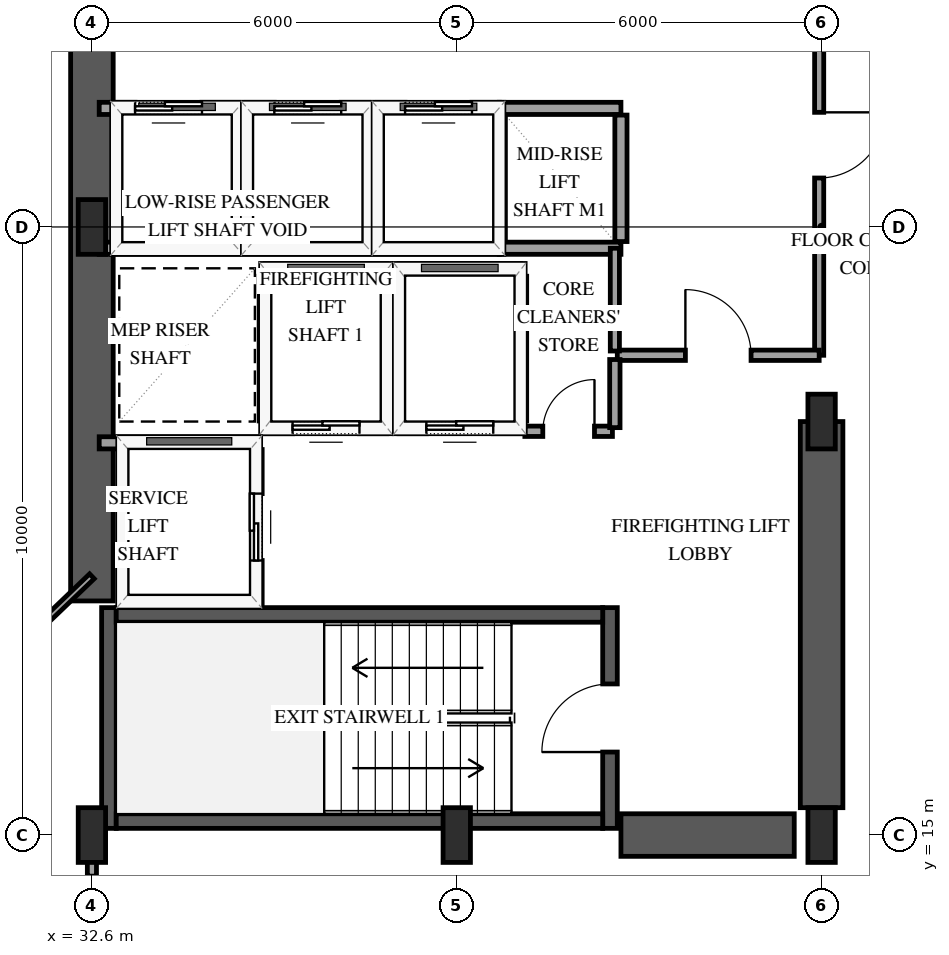
"""IFC4 building model, lengths in metres.
Left out: names, types, materials, properties, quantities, classifications, styles, units other than length and angle.
Written with IfcOpenShell. Run it as: python <this file> out.ifc"""

import sys

from ifc_helpers import new_model, si_unit, direction, frame, frame_2d, origin, origin_2d, place, context, subcontext, project, spatial, rectangle, extrude, element, fill, save


model = new_model("IFC4")
c1 = context("Model", 3, precision=1e-05, world=origin(), true_north=direction((0.0, 1.0)))
c2 = subcontext(c1, "Body", "Model", "MODEL_VIEW")
j1 = project(units=[si_unit("LENGTHUNIT", "METRE"), si_unit("PLANEANGLEUNIT", "RADIAN")], contexts=[c1])
p1 = place(None, origin())
s1 = spatial("IfcSite", under=j1, at=p1, CompositionType="ELEMENT")
p2 = place(p1, origin())
s2 = spatial("IfcBuilding", under=s1, at=p2, CompositionType="ELEMENT")
p3 = place(p2, frame((0.0, 0.0, 54.6)))
s3 = spatial("IfcBuildingStorey", under=s2, at=p3, CompositionType="ELEMENT", Elevation=54.6)
p4 = place(p3, frame((32.88, 15.11, 0.0), z_axis=(0.0, 0.0, 1.0), x_axis=(0.0, 1.0, 0.0)))
e1 = element("IfcWall", 1, at=p4, inside=s3, PredefinedType="SHEAR", context=c2, shape_type="SweptSolid", body=[
    extrude(rectangle(XDim=3.63, YDim=0.24, at=frame_2d((1.815, 0.0))), origin(), (0.0, 0.0, 1.0), 4.0),
])
p5 = place(p3, frame((41.12, 15.11, 0.0), z_axis=(0.0, 0.0, 1.0), x_axis=(0.0, 1.0, 0.0)))
e2 = element("IfcWall", 2, at=p5, inside=s3, PredefinedType="SHEAR", context=c2, shape_type="SweptSolid", body=[
    extrude(rectangle(XDim=3.63, YDim=0.24, at=frame_2d((1.815, 0.0))), origin(), (0.0, 0.0, 1.0), 4.0),
])
p6 = place(p5, frame((1.255, 0.0, 0.0)))
e3 = element("IfcOpeningElement", 3, at=p6, cuts=e2, PredefinedType="OPENING", context=c2, shape_type="SweptSolid", body=[
    extrude(rectangle(XDim=1.12, YDim=2.15, at=frame_2d((0.56, 1.075))), frame((0.0, 0.13, 0.0), z_axis=(0.0, -1.0, 0.0), x_axis=(1.0, 0.0, 0.0)), (0.0, 0.0, 1.0), 0.26),
])
for number, where, z_axis, x_axis in (
    (4, (33.0, 15.23, 0.0), (0.0, 0.0, 1.0), (1.0, 0.0, 0.0)),
    (5, (33.0, 18.62, 0.0), (0.0, 0.0, 1.0), (1.0, 0.0, 0.0)),
):
    element("IfcWall", number, at=place(p3, frame(where, z_axis=z_axis, x_axis=x_axis)), inside=s3, PredefinedType="SHEAR", context=c2, shape_type="SweptSolid", body=[
        extrude(rectangle(XDim=8.0, YDim=0.24, at=frame_2d((4.0, 0.0))), origin(), (0.0, 0.0, 1.0), 4.0),
    ])
p7 = place(p3, frame((32.6, 18.85, 0.0), z_axis=(0.0, 0.0, 1.0), x_axis=(0.0, 1.0, 0.0)))
e6 = element("IfcWall", 6, at=p7, inside=s3, PredefinedType="SHEAR", context=c2, shape_type="SweptSolid", body=[
    extrude(rectangle(XDim=12.3, YDim=0.7, at=frame_2d((6.15, 0.0))), origin(), (0.0, 0.0, 1.0), 4.0),
])
p8 = place(p3, frame((41.3, 15.0, 0.0), z_axis=(0.0, 0.0, 1.0), x_axis=(1.0, 0.0, 0.0)))
e7 = element("IfcWall", 7, at=p8, inside=s3, PredefinedType="SHEAR", context=c2, shape_type="SweptSolid", body=[
    extrude(rectangle(XDim=2.85, YDim=0.7, at=frame_2d((1.425, 0.0))), origin(), (0.0, 0.0, 1.0), 4.0),
])
p9 = place(p3, frame((44.6, 15.45, 0.0), z_axis=(0.0, 0.0, 1.0), x_axis=(0.0, 1.0, 0.0)))
e8 = element("IfcWall", 8, at=p9, inside=s3, PredefinedType="SHEAR", context=c2, shape_type="SweptSolid", body=[
    extrude(rectangle(XDim=6.35, YDim=0.7, at=frame_2d((3.175, 0.0))), origin(), (0.0, 0.0, 1.0), 4.0),
])
for number, where, z_axis, x_axis in (
    (9, (32.6, 15.0, 0.0), (0.0, 0.0, 1.0), (1.0, 0.0, 0.0)),
    (10, (32.6, 25.0, 0.0), (0.0, 0.0, 1.0), (1.0, 0.0, 0.0)),
    (11, (38.6, 15.0, 0.0), (0.0, 0.0, 1.0), (1.0, 0.0, 0.0)),
    (12, (44.6, 15.0, 0.0), (0.0, 0.0, 1.0), (1.0, 0.0, 0.0)),
    (13, (44.6, 21.8, 0.0), (0.0, 0.0, 1.0), (1.0, 0.0, 0.0)),
):
    element("IfcColumn", number, at=place(p3, frame(where, z_axis=z_axis, x_axis=x_axis)), inside=s3, PredefinedType="PILASTER", context=c2, shape_type="SweptSolid", body=[
        extrude(rectangle(XDim=0.45, YDim=0.9, at=origin_2d()), origin(), (0.0, 0.0, 1.0), 4.0),
    ])
p10 = place(p3, frame((35.45, 21.7, 0.0), z_axis=(0.0, 0.0, 1.0), x_axis=(1.0, 0.0, 0.0)))
e14 = element("IfcWall", 14, at=p10, inside=s3, PredefinedType="SOLIDWALL", context=c2, shape_type="SweptSolid", body=[
    extrude(rectangle(XDim=2.0, YDim=0.2, at=frame_2d((1.0, 0.0))), origin(), (0.0, 0.0, 1.0), 3.7),
])
p11 = place(p10, frame((0.45, 0.0, 0.0)))
e15 = element("IfcOpeningElement", 15, at=p11, cuts=e14, PredefinedType="OPENING", context=c2, shape_type="SweptSolid", body=[
    extrude(rectangle(XDim=1.1, YDim=2.15, at=frame_2d((0.55, 1.075))), frame((0.0, 0.11, 0.0), z_axis=(0.0, -1.0, 0.0), x_axis=(1.0, 0.0, 0.0)), (0.0, 0.0, 1.0), 0.22),
])
p12 = place(p3, frame((35.45, 24.3, 0.0), z_axis=(0.0, 0.0, 1.0), x_axis=(1.0, 0.0, 0.0)))
e16 = element("IfcWall", 16, at=p12, inside=s3, PredefinedType="SOLIDWALL", context=c2, shape_type="SweptSolid", body=[
    extrude(rectangle(XDim=2.0, YDim=0.2, at=frame_2d((1.0, 0.0))), origin(), (0.0, 0.0, 1.0), 3.7),
])
for number, where, z_axis, x_axis in (
    (17, (35.45, 21.81, 0.0), (0.0, 0.0, 1.0), (0.0, 1.0, 0.0)),
    (18, (37.45, 21.81, 0.0), (0.0, 0.0, 1.0), (0.0, 1.0, 0.0)),
):
    element("IfcWall", number, at=place(p3, frame(where, z_axis=z_axis, x_axis=x_axis)), inside=s3, PredefinedType="SOLIDWALL", context=c2, shape_type="SweptSolid", body=[
        extrude(rectangle(XDim=2.38, YDim=0.2, at=frame_2d((1.19, 0.0))), origin(), (0.0, 0.0, 1.0), 3.7),
    ])
p13 = place(p3, frame((37.65, 21.7, 0.0), z_axis=(0.0, 0.0, 1.0), x_axis=(1.0, 0.0, 0.0)))
e19 = element("IfcWall", 19, at=p13, inside=s3, PredefinedType="SOLIDWALL", context=c2, shape_type="SweptSolid", body=[
    extrude(rectangle(XDim=2.0, YDim=0.2, at=frame_2d((1.0, 0.0))), origin(), (0.0, 0.0, 1.0), 3.7),
])
p14 = place(p13, frame((0.45, 0.0, 0.0)))
e20 = element("IfcOpeningElement", 20, at=p14, cuts=e19, PredefinedType="OPENING", context=c2, shape_type="SweptSolid", body=[
    extrude(rectangle(XDim=1.1, YDim=2.15, at=frame_2d((0.55, 1.075))), frame((0.0, 0.11, 0.0), z_axis=(0.0, -1.0, 0.0), x_axis=(1.0, 0.0, 0.0)), (0.0, 0.0, 1.0), 0.22),
])
p15 = place(p3, frame((37.65, 24.3, 0.0), z_axis=(0.0, 0.0, 1.0), x_axis=(1.0, 0.0, 0.0)))
e21 = element("IfcWall", 21, at=p15, inside=s3, PredefinedType="SOLIDWALL", context=c2, shape_type="SweptSolid", body=[
    extrude(rectangle(XDim=2.0, YDim=0.2, at=frame_2d((1.0, 0.0))), origin(), (0.0, 0.0, 1.0), 3.7),
])
p16 = place(p3, frame((39.65, 21.81, 0.0), z_axis=(0.0, 0.0, 1.0), x_axis=(0.0, 1.0, 0.0)))
e22 = element("IfcWall", 22, at=p16, inside=s3, PredefinedType="SOLIDWALL", context=c2, shape_type="SweptSolid", body=[
    extrude(rectangle(XDim=2.38, YDim=0.2, at=frame_2d((1.19, 0.0))), origin(), (0.0, 0.0, 1.0), 3.7),
])
p17 = place(p3, frame((32.72, 21.45, 0.0), z_axis=(0.0, 0.0, 1.0), x_axis=(1.0, 0.0, 0.0)))
e23 = element("IfcWall", 23, at=p17, inside=s3, PredefinedType="SOLIDWALL", context=c2, shape_type="SweptSolid", body=[
    extrude(rectangle(XDim=2.58, YDim=0.2, at=frame_2d((1.29, 0.0))), origin(), (0.0, 0.0, 1.0), 3.7),
])
p18 = place(p3, frame((35.3, 18.79, 0.0), z_axis=(0.0, 0.0, 1.0), x_axis=(0.0, 1.0, 0.0)))
e24 = element("IfcWall", 24, at=p18, inside=s3, PredefinedType="SOLIDWALL", context=c2, shape_type="SweptSolid", body=[
    extrude(rectangle(XDim=2.55, YDim=0.2, at=frame_2d((1.275, 0.0))), origin(), (0.0, 0.0, 1.0), 3.7),
])
p19 = place(p18, frame((0.725, 0.0, 0.0)))
e25 = element("IfcOpeningElement", 25, at=p19, cuts=e24, PredefinedType="OPENING", context=c2, shape_type="SweptSolid", body=[
    extrude(rectangle(XDim=1.1, YDim=2.15, at=frame_2d((0.55, 1.075))), frame((0.0, 0.11, 0.0), z_axis=(0.0, -1.0, 0.0), x_axis=(1.0, 0.0, 0.0)), (0.0, 0.0, 1.0), 0.22),
])
p20 = place(p3, frame((32.72, 24.65, 0.0), z_axis=(0.0, 0.0, 1.0), x_axis=(1.0, 0.0, 0.0)))
e26 = element("IfcWall", 26, at=p20, inside=s3, PredefinedType="SOLIDWALL", context=c2, shape_type="SweptSolid", body=[
    extrude(rectangle(XDim=2.28, YDim=0.2, at=frame_2d((1.14, 0.0))), origin(), (0.0, 0.0, 1.0), 3.7),
])
p21 = place(p3, frame((32.72, 26.95, 0.0), z_axis=(0.0, 0.0, 1.0), x_axis=(1.0, 0.0, 0.0)))
e27 = element("IfcWall", 27, at=p21, inside=s3, PredefinedType="SOLIDWALL", context=c2, shape_type="SweptSolid", body=[
    extrude(rectangle(XDim=2.28, YDim=0.2, at=frame_2d((1.14, 0.0))), origin(), (0.0, 0.0, 1.0), 3.7),
])
p22 = place(p21, frame((0.59, 0.0, 0.0)))
e28 = element("IfcOpeningElement", 28, at=p22, cuts=e27, PredefinedType="OPENING", context=c2, shape_type="SweptSolid", body=[
    extrude(rectangle(XDim=1.1, YDim=2.15, at=frame_2d((0.55, 1.075))), frame((0.0, 0.11, 0.0), z_axis=(0.0, -1.0, 0.0), x_axis=(1.0, 0.0, 0.0)), (0.0, 0.0, 1.0), 0.22),
])
p23 = place(p3, frame((35.0, 24.76, 0.0), z_axis=(0.0, 0.0, 1.0), x_axis=(0.0, 1.0, 0.0)))
e29 = element("IfcWall", 29, at=p23, inside=s3, PredefinedType="SOLIDWALL", context=c2, shape_type="SweptSolid", body=[
    extrude(rectangle(XDim=2.08, YDim=0.2, at=frame_2d((1.04, 0.0))), origin(), (0.0, 0.0, 1.0), 3.7),
])
p24 = place(p3, frame((35.15, 24.65, 0.0), z_axis=(0.0, 0.0, 1.0), x_axis=(1.0, 0.0, 0.0)))
e30 = element("IfcWall", 30, at=p24, inside=s3, PredefinedType="SOLIDWALL", context=c2, shape_type="SweptSolid", body=[
    extrude(rectangle(XDim=2.0, YDim=0.2, at=frame_2d((1.0, 0.0))), origin(), (0.0, 0.0, 1.0), 3.7),
])
p25 = place(p3, frame((35.15, 26.95, 0.0), z_axis=(0.0, 0.0, 1.0), x_axis=(1.0, 0.0, 0.0)))
e31 = element("IfcWall", 31, at=p25, inside=s3, PredefinedType="SOLIDWALL", context=c2, shape_type="SweptSolid", body=[
    extrude(rectangle(XDim=2.0, YDim=0.2, at=frame_2d((1.0, 0.0))), origin(), (0.0, 0.0, 1.0), 3.7),
])
p26 = place(p25, frame((0.45, 0.0, 0.0)))
e32 = element("IfcOpeningElement", 32, at=p26, cuts=e31, PredefinedType="OPENING", context=c2, shape_type="SweptSolid", body=[
    extrude(rectangle(XDim=1.1, YDim=2.15, at=frame_2d((0.55, 1.075))), frame((0.0, 0.11, 0.0), z_axis=(0.0, -1.0, 0.0), x_axis=(1.0, 0.0, 0.0)), (0.0, 0.0, 1.0), 0.22),
])
p27 = place(p3, frame((37.15, 24.76, 0.0), z_axis=(0.0, 0.0, 1.0), x_axis=(0.0, 1.0, 0.0)))
e33 = element("IfcWall", 33, at=p27, inside=s3, PredefinedType="SOLIDWALL", context=c2, shape_type="SweptSolid", body=[
    extrude(rectangle(XDim=2.08, YDim=0.2, at=frame_2d((1.04, 0.0))), origin(), (0.0, 0.0, 1.0), 3.7),
])
p28 = place(p3, frame((37.3, 24.65, 0.0), z_axis=(0.0, 0.0, 1.0), x_axis=(1.0, 0.0, 0.0)))
e34 = element("IfcWall", 34, at=p28, inside=s3, PredefinedType="SOLIDWALL", context=c2, shape_type="SweptSolid", body=[
    extrude(rectangle(XDim=2.0, YDim=0.2, at=frame_2d((1.0, 0.0))), origin(), (0.0, 0.0, 1.0), 3.7),
])
p29 = place(p3, frame((37.3, 26.95, 0.0), z_axis=(0.0, 0.0, 1.0), x_axis=(1.0, 0.0, 0.0)))
e35 = element("IfcWall", 35, at=p29, inside=s3, PredefinedType="SOLIDWALL", context=c2, shape_type="SweptSolid", body=[
    extrude(rectangle(XDim=2.0, YDim=0.2, at=frame_2d((1.0, 0.0))), origin(), (0.0, 0.0, 1.0), 3.7),
])
p30 = place(p29, frame((0.45, 0.0, 0.0)))
e36 = element("IfcOpeningElement", 36, at=p30, cuts=e35, PredefinedType="OPENING", context=c2, shape_type="SweptSolid", body=[
    extrude(rectangle(XDim=1.1, YDim=2.15, at=frame_2d((0.55, 1.075))), frame((0.0, 0.11, 0.0), z_axis=(0.0, -1.0, 0.0), x_axis=(1.0, 0.0, 0.0)), (0.0, 0.0, 1.0), 0.22),
])
p31 = place(p3, frame((39.3, 24.76, 0.0), z_axis=(0.0, 0.0, 1.0), x_axis=(0.0, 1.0, 0.0)))
e37 = element("IfcWall", 37, at=p31, inside=s3, PredefinedType="SOLIDWALL", context=c2, shape_type="SweptSolid", body=[
    extrude(rectangle(XDim=2.08, YDim=0.2, at=frame_2d((1.04, 0.0))), origin(), (0.0, 0.0, 1.0), 3.7),
])
for number, where, z_axis, x_axis in (
    (38, (39.3, 24.65, 0.0), (0.0, 0.0, 1.0), (1.0, 0.0, 0.0)),
    (39, (39.3, 26.95, 0.0), (0.0, 0.0, 1.0), (1.0, 0.0, 0.0)),
):
    element("IfcWall", number, at=place(p3, frame(where, z_axis=z_axis, x_axis=x_axis)), inside=s3, PredefinedType="SOLIDWALL", context=c2, shape_type="SweptSolid", body=[
        extrude(rectangle(XDim=2.0, YDim=0.2, at=frame_2d((1.0, 0.0))), origin(), (0.0, 0.0, 1.0), 3.7),
    ])
p32 = place(p3, frame((41.3, 24.76, 0.0), z_axis=(0.0, 0.0, 1.0), x_axis=(0.0, 1.0, 0.0)))
e40 = element("IfcWall", 40, at=p32, inside=s3, PredefinedType="SOLIDWALL", context=c2, shape_type="SweptSolid", body=[
    extrude(rectangle(XDim=2.08, YDim=0.2, at=frame_2d((1.04, 0.0))), origin(), (0.0, 0.0, 1.0), 3.7),
])
p33 = place(p3, frame((44.56, 29.8, 0.0), z_axis=(0.0, 0.0, 1.0), x_axis=(0.0, -1.0, 0.0)))
e41 = element("IfcWall", 41, at=p33, inside=s3, PredefinedType="PARTITIONING", context=c2, shape_type="SweptSolid", body=[
    extrude(rectangle(XDim=6.91, YDim=0.15, at=frame_2d((3.455, 0.0))), origin(), (0.0, 0.0, 1.0), 2.74),
])
p34 = place(p33, frame((2.915, 0.0, 0.0)))
e42 = element("IfcOpeningElement", 42, at=p34, cuts=e41, PredefinedType="OPENING", context=c2, shape_type="SweptSolid", body=[
    extrude(rectangle(XDim=1.08, YDim=2.15, at=frame_2d((0.54, 1.075))), frame((0.0, 0.085, 0.0), z_axis=(0.0, -1.0, 0.0), x_axis=(1.0, 0.0, 0.0)), (0.0, 0.0, 1.0), 0.17),
])
p35 = place(p3, frame((32.6, 19.255, 0.0), z_axis=(0.0, 0.0, 1.0), x_axis=(-0.72235688482, -0.691520448687, 0.0)))
e43 = element("IfcWall", 43, at=p35, inside=s3, PredefinedType="PARTITIONING", context=c2, shape_type="SweptSolid", body=[
    extrude(rectangle(XDim=6.848, YDim=0.11, at=frame_2d((3.424, 0.0))), origin(), (0.0, 0.0, 1.0), 3.7),
])
p36 = place(p3, frame((41.24, 22.89, 0.0), z_axis=(0.0, 0.0, 1.0), x_axis=(1.0, 0.0, 0.0)))
e44 = element("IfcWall", 44, at=p36, inside=s3, PredefinedType="PARTITIONING", context=c2, shape_type="SweptSolid", body=[
    extrude(rectangle(XDim=3.32, YDim=0.17, at=frame_2d((1.66, 0.0))), origin(), (0.0, 0.0, 1.0), 3.7),
])
p37 = place(p36, frame((1.12, 0.0, 0.0)))
e45 = element("IfcOpeningElement", 45, at=p37, cuts=e44, PredefinedType="OPENING", context=c2, shape_type="SweptSolid", body=[
    extrude(rectangle(XDim=1.08, YDim=2.15, at=frame_2d((0.54, 1.075))), frame((0.0, 0.095, 0.0), z_axis=(0.0, -1.0, 0.0), x_axis=(1.0, 0.0, 0.0)), (0.0, 0.0, 1.0), 0.19),
])
p38 = place(p3, frame((32.6, 13.02, 0.0), z_axis=(0.0, 0.0, 1.0), x_axis=(0.0, 1.0, 0.0)))
e46 = element("IfcWall", 46, at=p38, inside=s3, PredefinedType="PARTITIONING", context=c2, shape_type="SweptSolid", body=[
    extrude(rectangle(XDim=1.91, YDim=0.15, at=frame_2d((0.955, 0.0))), origin(), (0.0, 0.0, 1.0), 3.7),
])
p39 = place(p38, frame((0.384, 0.0, 0.0)))
e47 = element("IfcOpeningElement", 47, at=p39, cuts=e46, PredefinedType="OPENING", context=c2, shape_type="SweptSolid", body=[
    extrude(rectangle(XDim=0.92, YDim=2.12, at=frame_2d((0.46, 1.06))), frame((0.0, 0.085, 0.0), z_axis=(0.0, -1.0, 0.0), x_axis=(1.0, 0.0, 0.0)), (0.0, 0.0, 1.0), 0.17),
])
p40 = place(p3, frame((41.2, 22.96, 0.0), z_axis=(0.0, 0.0, 1.0), x_axis=(0.0, 1.0, 0.0)))
e48 = element("IfcWall", 48, at=p40, inside=s3, PredefinedType="PARTITIONING", context=c2, shape_type="SweptSolid", body=[
    extrude(rectangle(XDim=1.69, YDim=0.15, at=frame_2d((0.845, 0.0))), origin(), (0.0, 0.0, 1.0), 3.7),
])
p41 = place(p3, frame((39.72, 21.64, 0.0), z_axis=(0.0, 0.0, 1.0), x_axis=(1.0, 0.0, 0.0)))
e49 = element("IfcWall", 49, at=p41, inside=s3, PredefinedType="PARTITIONING", context=c2, shape_type="SweptSolid", body=[
    extrude(rectangle(XDim=1.44, YDim=0.17, at=frame_2d((0.72, 0.0))), origin(), (0.0, 0.0, 1.0), 3.7),
])
p42 = place(p41, frame((0.295, 0.0, 0.0)))
e50 = element("IfcOpeningElement", 50, at=p42, cuts=e49, PredefinedType="OPENING", context=c2, shape_type="SweptSolid", body=[
    extrude(rectangle(XDim=0.85, YDim=2.1, at=frame_2d((0.425, 1.05))), frame((0.0, 0.095, 0.0), z_axis=(0.0, -1.0, 0.0), x_axis=(1.0, 0.0, 0.0)), (0.0, 0.0, 1.0), 0.19),
])
p43 = place(p3, frame((41.2, 21.7, 0.0), z_axis=(0.0, 0.0, 1.0), x_axis=(0.0, 1.0, 0.0)))
e51 = element("IfcWall", 51, at=p43, inside=s3, PredefinedType="PARTITIONING", context=c2, shape_type="SweptSolid", body=[
    extrude(rectangle(XDim=1.12, YDim=0.17, at=frame_2d((0.56, 0.0))), origin(), (0.0, 0.0, 1.0), 3.7),
])
p44 = place(p11, origin())
e52 = element("IfcDoor", 52, at=p44, inside=s3, OperationType="SLIDING_TO_LEFT", PredefinedType="DOOR", context=c2, shape_type="SweptSolid", body=[
    extrude(rectangle(XDim=1.1, YDim=2.15, at=frame_2d((0.55, 1.075))), frame((0.0, 0.025, 0.0), z_axis=(0.0, -1.0, 0.0), x_axis=(1.0, 0.0, 0.0)), (0.0, 0.0, 1.0), 0.05),
])
fill(e15, e52)
p45 = place(p14, origin())
e53 = element("IfcDoor", 53, at=p45, inside=s3, OperationType="SLIDING_TO_LEFT", PredefinedType="DOOR", context=c2, shape_type="SweptSolid", body=[
    extrude(rectangle(XDim=1.1, YDim=2.15, at=frame_2d((0.55, 1.075))), frame((0.0, 0.025, 0.0), z_axis=(0.0, -1.0, 0.0), x_axis=(1.0, 0.0, 0.0)), (0.0, 0.0, 1.0), 0.05),
])
fill(e20, e53)
p46 = place(p19, origin())
e54 = element("IfcDoor", 54, at=p46, inside=s3, OperationType="SLIDING_TO_LEFT", PredefinedType="DOOR", context=c2, shape_type="SweptSolid", body=[
    extrude(rectangle(XDim=1.1, YDim=2.15, at=frame_2d((0.55, 1.075))), frame((0.0, 0.025, 0.0), z_axis=(0.0, -1.0, 0.0), x_axis=(1.0, 0.0, 0.0)), (0.0, 0.0, 1.0), 0.05),
])
fill(e25, e54)
p47 = place(p22, origin())
e55 = element("IfcDoor", 55, at=p47, inside=s3, OperationType="SLIDING_TO_LEFT", PredefinedType="DOOR", context=c2, shape_type="SweptSolid", body=[
    extrude(rectangle(XDim=1.1, YDim=2.15, at=frame_2d((0.55, 1.075))), frame((0.0, 0.025, 0.0), z_axis=(0.0, -1.0, 0.0), x_axis=(1.0, 0.0, 0.0)), (0.0, 0.0, 1.0), 0.05),
])
fill(e28, e55)
p48 = place(p26, origin())
e56 = element("IfcDoor", 56, at=p48, inside=s3, OperationType="SLIDING_TO_LEFT", PredefinedType="DOOR", context=c2, shape_type="SweptSolid", body=[
    extrude(rectangle(XDim=1.1, YDim=2.15, at=frame_2d((0.55, 1.075))), frame((0.0, 0.025, 0.0), z_axis=(0.0, -1.0, 0.0), x_axis=(1.0, 0.0, 0.0)), (0.0, 0.0, 1.0), 0.05),
])
fill(e32, e56)
p49 = place(p30, origin())
e57 = element("IfcDoor", 57, at=p49, inside=s3, OperationType="SLIDING_TO_LEFT", PredefinedType="DOOR", context=c2, shape_type="SweptSolid", body=[
    extrude(rectangle(XDim=1.1, YDim=2.15, at=frame_2d((0.55, 1.075))), frame((0.0, 0.025, 0.0), z_axis=(0.0, -1.0, 0.0), x_axis=(1.0, 0.0, 0.0)), (0.0, 0.0, 1.0), 0.05),
])
fill(e36, e57)
p50 = place(p6, origin())
e58 = element("IfcDoor", 58, at=p50, inside=s3, OperationType="SINGLE_SWING_LEFT", PredefinedType="DOOR", context=c2, shape_type="SweptSolid", body=[
    extrude(rectangle(XDim=1.12, YDim=2.15, at=frame_2d((0.56, 1.075))), frame((0.0, 0.025, 0.0), z_axis=(0.0, -1.0, 0.0), x_axis=(1.0, 0.0, 0.0)), (0.0, 0.0, 1.0), 0.05),
])
fill(e3, e58)
p51 = place(p34, origin())
e59 = element("IfcDoor", 59, at=p51, inside=s3, OperationType="SINGLE_SWING_LEFT", PredefinedType="DOOR", context=c2, shape_type="SweptSolid", body=[
    extrude(rectangle(XDim=1.08, YDim=2.15, at=frame_2d((0.54, 1.075))), frame((0.0, 0.025, 0.0), z_axis=(0.0, -1.0, 0.0), x_axis=(1.0, 0.0, 0.0)), (0.0, 0.0, 1.0), 0.05),
])
fill(e42, e59)
p52 = place(p37, origin())
e60 = element("IfcDoor", 60, at=p52, inside=s3, OperationType="SINGLE_SWING_LEFT", PredefinedType="DOOR", context=c2, shape_type="SweptSolid", body=[
    extrude(rectangle(XDim=1.08, YDim=2.15, at=frame_2d((0.54, 1.075))), frame((0.0, 0.025, 0.0), z_axis=(0.0, -1.0, 0.0), x_axis=(1.0, 0.0, 0.0)), (0.0, 0.0, 1.0), 0.05),
])
fill(e45, e60)
p53 = place(p42, origin())
e61 = element("IfcDoor", 61, at=p53, inside=s3, OperationType="SINGLE_SWING_RIGHT", PredefinedType="DOOR", context=c2, shape_type="SweptSolid", body=[
    extrude(rectangle(XDim=0.85, YDim=2.1, at=frame_2d((0.425, 1.05))), frame((0.0, 0.025, 0.0), z_axis=(0.0, -1.0, 0.0), x_axis=(1.0, 0.0, 0.0)), (0.0, 0.0, 1.0), 0.05),
])
fill(e50, e61)
save(model, sys.argv[1])
